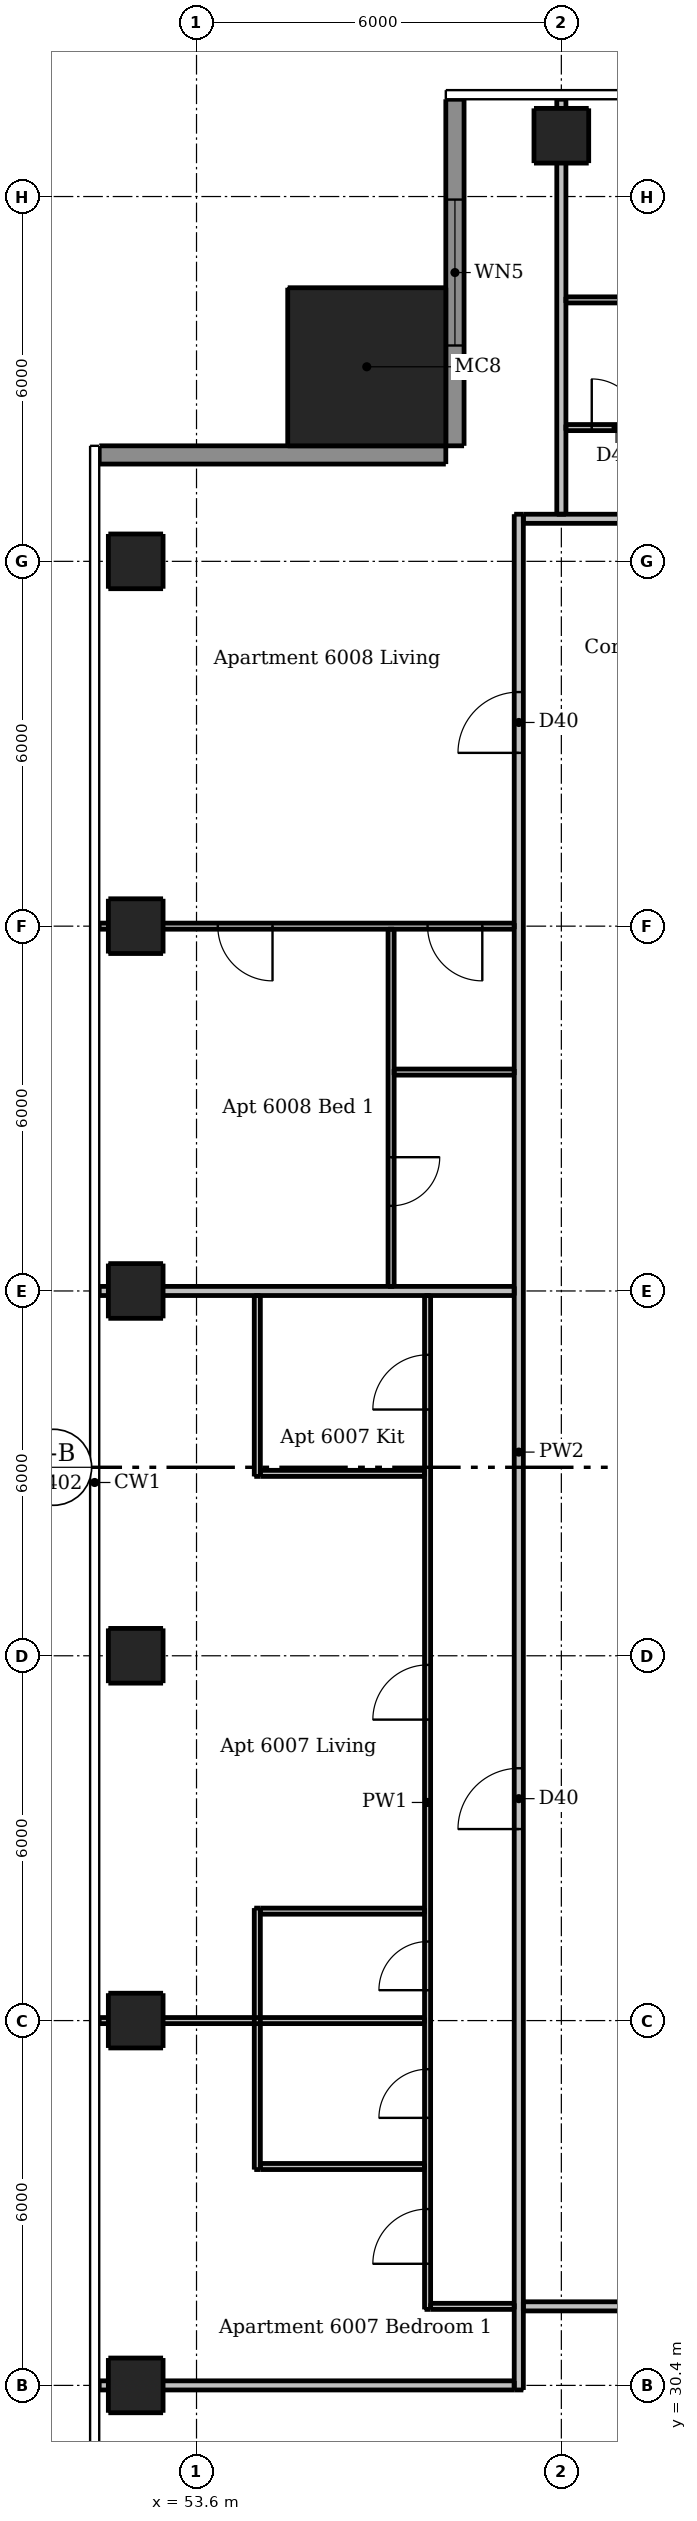
"""IFC4 building model, lengths in metres.
Left out: names, types, materials, properties, quantities, classifications, styles, units other than length and angle.
Written with IfcOpenShell. Run it as: python <this file> out.ifc"""

import sys

from ifc_helpers import new_model, si_unit, direction, frame, frame_2d, origin, origin_2d, place, context, subcontext, project, spatial, rectangle, extrude, element, fill, save


model = new_model("IFC4")
c1 = context("Model", 3, precision=1e-05, world=origin(), true_north=direction((0.0, 1.0)))
c2 = subcontext(c1, "Body", "Model", "MODEL_VIEW")
j1 = project(units=[si_unit("LENGTHUNIT", "METRE"), si_unit("PLANEANGLEUNIT", "RADIAN")], contexts=[c1])
p1 = place(None, origin())
s1 = spatial("IfcSite", under=j1, at=p1, CompositionType="ELEMENT")
p2 = place(p1, origin())
s2 = spatial("IfcBuilding", under=s1, at=p2, CompositionType="ELEMENT")
p3 = place(p2, frame((0.0, 0.0, 223.3)))
s3 = spatial("IfcBuildingStorey", under=s2, at=p3, CompositionType="ELEMENT", Elevation=223.3)
for number, where, z_axis, x_axis in (
    (1, (59.6, 67.4, 0.0), (0.0, 0.0, 1.0), (1.0, 0.0, 0.0)),
    (2, (52.6, 30.4, 0.0), (0.0, 0.0, 1.0), (1.0, 0.0, 0.0)),
    (3, (52.6, 36.4, 0.0), (0.0, 0.0, 1.0), (1.0, 0.0, 0.0)),
    (4, (52.6, 42.4, 0.0), (0.0, 0.0, 1.0), (1.0, 0.0, 0.0)),
    (5, (52.6, 48.4, 0.0), (0.0, 0.0, 1.0), (1.0, 0.0, 0.0)),
    (6, (52.6, 54.4, 0.0), (0.0, 0.0, 1.0), (1.0, 0.0, 0.0)),
    (7, (52.6, 60.4, 0.0), (0.0, 0.0, 1.0), (1.0, 0.0, 0.0)),
):
    element("IfcColumn", number, at=place(p3, frame(where, z_axis=z_axis, x_axis=x_axis)), inside=s3, PredefinedType="COLUMN", context=c2, shape_type="SweptSolid", body=[
        extrude(rectangle(XDim=0.9, YDim=0.9, at=origin_2d()), origin(), (0.0, 0.0, 1.0), 3.05),
    ])
p4 = place(p3, frame((56.4, 63.6, 0.0), z_axis=(0.0, 0.0, 1.0), x_axis=(1.0, 0.0, 0.0)))
e8 = element("IfcColumn", 8, at=p4, inside=s3, PredefinedType="COLUMN", context=c2, shape_type="SweptSolid", body=[
    extrude(rectangle(XDim=2.6, YDim=2.6, at=origin_2d()), origin(), (0.0, 0.0, 1.0), 3.3),
])
p5 = place(p3, frame((57.85, 68.0, 0.0), z_axis=(0.0, 0.0, 1.0), x_axis=(0.0, -1.0, 0.0)))
e9 = element("IfcWall", 9, at=p5, inside=s3, PredefinedType="SOLIDWALL", context=c2, shape_type="SweptSolid", body=[
    extrude(rectangle(XDim=5.7, YDim=0.3, at=frame_2d((2.85, 0.0))), origin(), (0.0, 0.0, 1.0), 3.05),
])
p6 = place(p5, frame((1.65, 0.0, 0.15)))
e10 = element("IfcOpeningElement", 10, at=p6, cuts=e9, PredefinedType="OPENING", context=c2, shape_type="SweptSolid", body=[
    extrude(rectangle(XDim=2.4, YDim=2.1, at=frame_2d((1.2, 1.05))), frame((0.0, 0.16, 0.0), z_axis=(0.0, -1.0, 0.0), x_axis=(1.0, 0.0, 0.0)), (0.0, 0.0, 1.0), 0.32),
])
p7 = place(p3, frame((57.7, 62.15, 0.0), z_axis=(0.0, 0.0, 1.0), x_axis=(-1.0, 0.0, 0.0)))
e11 = element("IfcWall", 11, at=p7, inside=s3, PredefinedType="SOLIDWALL", context=c2, shape_type="SweptSolid", body=[
    extrude(rectangle(XDim=5.7, YDim=0.3, at=frame_2d((2.85, 0.0))), origin(), (0.0, 0.0, 1.0), 3.05),
])
p8 = place(p3, frame((54.6, 33.95, 0.0), z_axis=(0.0, 0.0, 1.0), x_axis=(0.0, 1.0, 0.0)))
e12 = element("IfcWall", 12, at=p8, inside=s3, PredefinedType="PARTITIONING", context=c2, shape_type="SweptSolid", body=[
    extrude(rectangle(XDim=4.3, YDim=0.1, at=frame_2d((2.15, 0.0))), origin(), (0.0, 0.0, 1.0), 3.05),
])
p9 = place(p3, frame((54.6, 45.35, 0.0), z_axis=(0.0, 0.0, 1.0), x_axis=(0.0, 1.0, 0.0)))
e13 = element("IfcWall", 13, at=p9, inside=s3, PredefinedType="PARTITIONING", context=c2, shape_type="SweptSolid", body=[
    extrude(rectangle(XDim=2.975, YDim=0.1, at=frame_2d((1.487, 0.0))), origin(), (0.0, 0.0, 1.0), 3.05),
])
p10 = place(p3, frame((56.8, 54.35, 0.0), z_axis=(0.0, 0.0, 1.0), x_axis=(0.0, -1.0, 0.0)))
e14 = element("IfcWall", 14, at=p10, inside=s3, PredefinedType="PARTITIONING", context=c2, shape_type="SweptSolid", body=[
    extrude(rectangle(XDim=5.875, YDim=0.1, at=frame_2d((2.938, 0.0))), origin(), (0.0, 0.0, 1.0), 3.05),
])
p11 = place(p10, frame((3.75, 0.0, 0.0)))
e15 = element("IfcOpeningElement", 15, at=p11, cuts=e14, PredefinedType="OPENING", context=c2, shape_type="SweptSolid", body=[
    extrude(rectangle(XDim=0.8, YDim=2.1, at=frame_2d((0.4, 1.05))), frame((0.0, 0.06, 0.0), z_axis=(0.0, -1.0, 0.0), x_axis=(1.0, 0.0, 0.0)), (0.0, 0.0, 1.0), 0.12),
])
p12 = place(p3, frame((57.4, 31.65, 0.0), z_axis=(0.0, 0.0, 1.0), x_axis=(0.0, 1.0, 0.0)))
e16 = element("IfcWall", 16, at=p12, inside=s3, PredefinedType="PARTITIONING", context=c2, shape_type="SweptSolid", body=[
    extrude(rectangle(XDim=16.675, YDim=0.1, at=frame_2d((8.337, 0.0))), origin(), (0.0, 0.0, 1.0), 3.05),
])
p13 = place(p12, frame((9.7, 0.0, 0.0)))
e17 = element("IfcOpeningElement", 17, at=p13, cuts=e16, PredefinedType="OPENING", context=c2, shape_type="SweptSolid", body=[
    extrude(rectangle(XDim=0.9, YDim=2.1, at=frame_2d((0.45, 1.05))), frame((0.0, 0.06, 0.0), z_axis=(0.0, -1.0, 0.0), x_axis=(1.0, 0.0, 0.0)), (0.0, 0.0, 1.0), 0.12),
])
p14 = place(p12, frame((14.8, 0.0, 0.0)))
e18 = element("IfcOpeningElement", 18, at=p14, cuts=e16, PredefinedType="OPENING", context=c2, shape_type="SweptSolid", body=[
    extrude(rectangle(XDim=0.9, YDim=2.1, at=frame_2d((0.45, 1.05))), frame((0.0, 0.06, 0.0), z_axis=(0.0, -1.0, 0.0), x_axis=(1.0, 0.0, 0.0)), (0.0, 0.0, 1.0), 0.12),
])
p15 = place(p12, frame((5.25, 0.0, 0.0)))
e19 = element("IfcOpeningElement", 19, at=p15, cuts=e16, PredefinedType="OPENING", context=c2, shape_type="SweptSolid", body=[
    extrude(rectangle(XDim=0.8, YDim=2.1, at=frame_2d((0.4, 1.05))), frame((0.0, 0.06, 0.0), z_axis=(0.0, -1.0, 0.0), x_axis=(1.0, 0.0, 0.0)), (0.0, 0.0, 1.0), 0.12),
])
p16 = place(p12, frame((0.75, 0.0, 0.0)))
e20 = element("IfcOpeningElement", 20, at=p16, cuts=e16, PredefinedType="OPENING", context=c2, shape_type="SweptSolid", body=[
    extrude(rectangle(XDim=0.9, YDim=2.1, at=frame_2d((0.45, 1.05))), frame((0.0, 0.06, 0.0), z_axis=(0.0, -1.0, 0.0), x_axis=(1.0, 0.0, 0.0)), (0.0, 0.0, 1.0), 0.12),
])
p17 = place(p12, frame((3.15, 0.0, 0.0)))
e21 = element("IfcOpeningElement", 21, at=p17, cuts=e16, PredefinedType="OPENING", context=c2, shape_type="SweptSolid", body=[
    extrude(rectangle(XDim=0.8, YDim=2.1, at=frame_2d((0.4, 1.05))), frame((0.0, 0.06, 0.0), z_axis=(0.0, -1.0, 0.0), x_axis=(1.0, 0.0, 0.0)), (0.0, 0.0, 1.0), 0.12),
])
p18 = place(p3, frame((59.675, 64.7, 0.0), z_axis=(0.0, 0.0, 1.0), x_axis=(1.0, 0.0, 0.0)))
e22 = element("IfcWall", 22, at=p18, inside=s3, PredefinedType="PARTITIONING", context=c2, shape_type="SweptSolid", body=[
    extrude(rectangle(XDim=1.675, YDim=0.1, at=frame_2d((0.837, 0.0))), origin(), (0.0, 0.0, 1.0), 3.05),
])
p19 = place(p3, frame((59.675, 62.6, 0.0), z_axis=(0.0, 0.0, 1.0), x_axis=(1.0, 0.0, 0.0)))
e23 = element("IfcWall", 23, at=p19, inside=s3, PredefinedType="PARTITIONING", context=c2, shape_type="SweptSolid", body=[
    extrude(rectangle(XDim=17.85, YDim=0.1, at=frame_2d((8.925, 0.0))), origin(), (0.0, 0.0, 1.0), 3.05),
])
p20 = place(p19, frame((4.875, 0.0, 0.0)))
e24 = element("IfcOpeningElement", 24, at=p20, cuts=e23, PredefinedType="OPENING", context=c2, shape_type="SweptSolid", body=[
    extrude(rectangle(XDim=0.9, YDim=2.1, at=frame_2d((0.45, 1.05))), frame((0.0, 0.06, 0.0), z_axis=(0.0, -1.0, 0.0), x_axis=(1.0, 0.0, 0.0)), (0.0, 0.0, 1.0), 0.12),
])
p21 = place(p19, frame((9.975, 0.0, 0.0)))
e25 = element("IfcOpeningElement", 25, at=p21, cuts=e23, PredefinedType="OPENING", context=c2, shape_type="SweptSolid", body=[
    extrude(rectangle(XDim=0.9, YDim=2.1, at=frame_2d((0.45, 1.05))), frame((0.0, 0.06, 0.0), z_axis=(0.0, -1.0, 0.0), x_axis=(1.0, 0.0, 0.0)), (0.0, 0.0, 1.0), 0.12),
])
p22 = place(p19, frame((0.425, 0.0, 0.0)))
e26 = element("IfcOpeningElement", 26, at=p22, cuts=e23, PredefinedType="OPENING", context=c2, shape_type="SweptSolid", body=[
    extrude(rectangle(XDim=0.8, YDim=2.1, at=frame_2d((0.4, 1.05))), frame((0.0, 0.06, 0.0), z_axis=(0.0, -1.0, 0.0), x_axis=(1.0, 0.0, 0.0)), (0.0, 0.0, 1.0), 0.12),
])
p23 = place(p19, frame((15.675, 0.0, 0.0)))
e27 = element("IfcOpeningElement", 27, at=p23, cuts=e23, PredefinedType="OPENING", context=c2, shape_type="SweptSolid", body=[
    extrude(rectangle(XDim=0.9, YDim=2.1, at=frame_2d((0.45, 1.05))), frame((0.0, 0.06, 0.0), z_axis=(0.0, -1.0, 0.0), x_axis=(1.0, 0.0, 0.0)), (0.0, 0.0, 1.0), 0.12),
])
p24 = place(p19, frame((12.725, 0.0, 0.0)))
e28 = element("IfcOpeningElement", 28, at=p24, cuts=e23, PredefinedType="OPENING", context=c2, shape_type="SweptSolid", body=[
    extrude(rectangle(XDim=0.8, YDim=2.1, at=frame_2d((0.4, 1.05))), frame((0.0, 0.06, 0.0), z_axis=(0.0, -1.0, 0.0), x_axis=(1.0, 0.0, 0.0)), (0.0, 0.0, 1.0), 0.12),
])
p25 = place(p3, frame((58.825, 54.4, 0.0), z_axis=(0.0, 0.0, 1.0), x_axis=(-1.0, 0.0, 0.0)))
e29 = element("IfcWall", 29, at=p25, inside=s3, PredefinedType="PARTITIONING", context=c2, shape_type="SweptSolid", body=[
    extrude(rectangle(XDim=6.825, YDim=0.1, at=frame_2d((3.413, 0.0))), origin(), (0.0, 0.0, 1.0), 2.516),
])
p26 = place(p25, frame((0.525, 0.0, 0.0)))
e30 = element("IfcOpeningElement", 30, at=p26, cuts=e29, PredefinedType="OPENING", context=c2, shape_type="SweptSolid", body=[
    extrude(rectangle(XDim=0.9, YDim=2.1, at=frame_2d((0.45, 1.05))), frame((0.0, 0.06, 0.0), z_axis=(0.0, -1.0, 0.0), x_axis=(1.0, 0.0, 0.0)), (0.0, 0.0, 1.0), 0.12),
])
p27 = place(p25, frame((3.975, 0.0, 0.0)))
e31 = element("IfcOpeningElement", 31, at=p27, cuts=e29, PredefinedType="OPENING", context=c2, shape_type="SweptSolid", body=[
    extrude(rectangle(XDim=0.9, YDim=2.1, at=frame_2d((0.45, 1.05))), frame((0.0, 0.06, 0.0), z_axis=(0.0, -1.0, 0.0), x_axis=(1.0, 0.0, 0.0)), (0.0, 0.0, 1.0), 0.12),
])
p28 = place(p3, frame((56.85, 52.0, 0.0), z_axis=(0.0, 0.0, 1.0), x_axis=(1.0, 0.0, 0.0)))
e32 = element("IfcWall", 32, at=p28, inside=s3, PredefinedType="PARTITIONING", context=c2, shape_type="SweptSolid", body=[
    extrude(rectangle(XDim=1.975, YDim=0.1, at=frame_2d((0.987, 0.0))), origin(), (0.0, 0.0, 1.0), 3.05),
])
for number, where, z_axis, x_axis in (
    (33, (54.65, 45.4, 0.0), (0.0, 0.0, 1.0), (1.0, 0.0, 0.0)),
    (34, (54.65, 38.2, 0.0), (0.0, 0.0, 1.0), (1.0, 0.0, 0.0)),
):
    element("IfcWall", number, at=place(p3, frame(where, z_axis=z_axis, x_axis=x_axis)), inside=s3, PredefinedType="PARTITIONING", context=c2, shape_type="SweptSolid", body=[
        extrude(rectangle(XDim=2.7, YDim=0.1, at=frame_2d((1.35, 0.0))), origin(), (0.0, 0.0, 1.0), 3.05),
    ])
p29 = place(p3, frame((52.0, 36.4, 0.0), z_axis=(0.0, 0.0, 1.0), x_axis=(1.0, 0.0, 0.0)))
e35 = element("IfcWall", 35, at=p29, inside=s3, PredefinedType="PARTITIONING", context=c2, shape_type="SweptSolid", body=[
    extrude(rectangle(XDim=5.35, YDim=0.1, at=frame_2d((2.675, 0.0))), origin(), (0.0, 0.0, 1.0), 2.516),
])
p30 = place(p3, frame((54.65, 34.0, 0.0), z_axis=(0.0, 0.0, 1.0), x_axis=(1.0, 0.0, 0.0)))
e36 = element("IfcWall", 36, at=p30, inside=s3, PredefinedType="PARTITIONING", context=c2, shape_type="SweptSolid", body=[
    extrude(rectangle(XDim=2.7, YDim=0.1, at=frame_2d((1.35, 0.0))), origin(), (0.0, 0.0, 1.0), 3.05),
])
p31 = place(p3, frame((57.45, 31.7, 0.0), z_axis=(0.0, 0.0, 1.0), x_axis=(1.0, 0.0, 0.0)))
e37 = element("IfcWall", 37, at=p31, inside=s3, PredefinedType="PARTITIONING", context=c2, shape_type="SweptSolid", body=[
    extrude(rectangle(XDim=1.375, YDim=0.1, at=frame_2d((0.688, 0.0))), origin(), (0.0, 0.0, 1.0), 3.05),
])
p32 = place(p3, frame((58.9, 30.325, 0.0), z_axis=(0.0, 0.0, 1.0), x_axis=(0.0, 1.0, 0.0)))
e38 = element("IfcWall", 38, at=p32, inside=s3, PredefinedType="PARTITIONING", context=c2, shape_type="SweptSolid", body=[
    extrude(rectangle(XDim=30.85, YDim=0.15, at=frame_2d((15.425, 0.0))), origin(), (0.0, 0.0, 1.0), 3.05),
])
p33 = place(p32, frame((9.225, 0.0, 0.0)))
e39 = element("IfcOpeningElement", 39, at=p33, cuts=e38, PredefinedType="OPENING", context=c2, shape_type="SweptSolid", body=[
    extrude(rectangle(XDim=1.0, YDim=2.1, at=frame_2d((0.5, 1.05))), frame((0.0, 0.085, 0.0), z_axis=(0.0, -1.0, 0.0), x_axis=(1.0, 0.0, 0.0)), (0.0, 0.0, 1.0), 0.17),
])
p34 = place(p32, frame((26.925, 0.0, 0.0)))
e40 = element("IfcOpeningElement", 40, at=p34, cuts=e38, PredefinedType="OPENING", context=c2, shape_type="SweptSolid", body=[
    extrude(rectangle(XDim=1.0, YDim=2.1, at=frame_2d((0.5, 1.05))), frame((0.0, 0.085, 0.0), z_axis=(0.0, -1.0, 0.0), x_axis=(1.0, 0.0, 0.0)), (0.0, 0.0, 1.0), 0.17),
])
p35 = place(p3, frame((59.6, 61.175, 0.0), z_axis=(0.0, 0.0, 1.0), x_axis=(0.0, 1.0, 0.0)))
e41 = element("IfcWall", 41, at=p35, inside=s3, PredefinedType="PARTITIONING", context=c2, shape_type="SweptSolid", body=[
    extrude(rectangle(XDim=6.825, YDim=0.15, at=frame_2d((3.413, 0.0))), origin(), (0.0, 0.0, 1.0), 2.51),
])
p36 = place(p3, frame((58.975, 61.1, 0.0), z_axis=(0.0, 0.0, 1.0), x_axis=(1.0, 0.0, 0.0)))
e42 = element("IfcWall", 42, at=p36, inside=s3, PredefinedType="PARTITIONING", context=c2, shape_type="SweptSolid", body=[
    extrude(rectangle(XDim=29.25, YDim=0.15, at=frame_2d((14.625, 0.0))), origin(), (0.0, 0.0, 1.0), 3.05),
])
p37 = place(p36, frame((9.125, 0.0, 0.0)))
e43 = element("IfcOpeningElement", 43, at=p37, cuts=e42, PredefinedType="OPENING", context=c2, shape_type="SweptSolid", body=[
    extrude(rectangle(XDim=1.0, YDim=2.1, at=frame_2d((0.5, 1.05))), frame((0.0, 0.085, 0.0), z_axis=(0.0, -1.0, 0.0), x_axis=(1.0, 0.0, 0.0)), (0.0, 0.0, 1.0), 0.17),
])
p38 = place(p36, frame((26.475, 0.0, 0.0)))
e44 = element("IfcOpeningElement", 44, at=p38, cuts=e42, PredefinedType="OPENING", context=c2, shape_type="SweptSolid", body=[
    extrude(rectangle(XDim=1.0, YDim=2.1, at=frame_2d((0.5, 1.05))), frame((0.0, 0.085, 0.0), z_axis=(0.0, -1.0, 0.0), x_axis=(1.0, 0.0, 0.0)), (0.0, 0.0, 1.0), 0.17),
])
p39 = place(p3, frame((52.0, 48.4, 0.0), z_axis=(0.0, 0.0, 1.0), x_axis=(1.0, 0.0, 0.0)))
e45 = element("IfcWall", 45, at=p39, inside=s3, PredefinedType="PARTITIONING", context=c2, shape_type="SweptSolid", body=[
    extrude(rectangle(XDim=6.825, YDim=0.15, at=frame_2d((3.413, 0.0))), origin(), (0.0, 0.0, 1.0), 2.516),
])
p40 = place(p3, frame((89.525, 31.7, 0.0), z_axis=(0.0, 0.0, 1.0), x_axis=(-1.0, 0.0, 0.0)))
e46 = element("IfcWall", 46, at=p40, inside=s3, PredefinedType="PARTITIONING", context=c2, shape_type="SweptSolid", body=[
    extrude(rectangle(XDim=30.55, YDim=0.15, at=frame_2d((15.275, 0.0))), origin(), (0.0, 0.0, 1.0), 3.05),
])
p41 = place(p40, frame((26.775, 0.0, 0.0)))
e47 = element("IfcOpeningElement", 47, at=p41, cuts=e46, PredefinedType="OPENING", context=c2, shape_type="SweptSolid", body=[
    extrude(rectangle(XDim=1.0, YDim=2.1, at=frame_2d((0.5, 1.05))), frame((0.0, 0.085, 0.0), z_axis=(0.0, -1.0, 0.0), x_axis=(1.0, 0.0, 0.0)), (0.0, 0.0, 1.0), 0.17),
])
p42 = place(p40, frame((9.075, 0.0, 0.0)))
e48 = element("IfcOpeningElement", 48, at=p42, cuts=e46, PredefinedType="OPENING", context=c2, shape_type="SweptSolid", body=[
    extrude(rectangle(XDim=1.0, YDim=2.1, at=frame_2d((0.5, 1.05))), frame((0.0, 0.085, 0.0), z_axis=(0.0, -1.0, 0.0), x_axis=(1.0, 0.0, 0.0)), (0.0, 0.0, 1.0), 0.17),
])
p43 = place(p3, frame((52.0, 30.4, 0.0), z_axis=(0.0, 0.0, 1.0), x_axis=(1.0, 0.0, 0.0)))
e49 = element("IfcWall", 49, at=p43, inside=s3, PredefinedType="PARTITIONING", context=c2, shape_type="SweptSolid", body=[
    extrude(rectangle(XDim=6.825, YDim=0.15, at=frame_2d((3.413, 0.0))), origin(), (0.0, 0.0, 1.0), 2.647),
])
p44 = place(p6, origin())
e50 = element("IfcWindow", 50, at=p44, inside=s3, PartitioningType="DOUBLE_PANEL_VERTICAL", PredefinedType="WINDOW", context=c2, shape_type="SweptSolid", body=[
    extrude(rectangle(XDim=2.4, YDim=2.1, at=frame_2d((1.2, 1.05))), frame((0.0, 0.03, 0.0), z_axis=(0.0, -1.0, 0.0), x_axis=(1.0, 0.0, 0.0)), (0.0, 0.0, 1.0), 0.06),
])
fill(e10, e50)
p45 = place(p22, origin())
e51 = element("IfcDoor", 51, at=p45, inside=s3, OperationType="SINGLE_SWING_LEFT", PredefinedType="DOOR", context=c2, shape_type="SweptSolid", body=[
    extrude(rectangle(XDim=0.8, YDim=2.1, at=frame_2d((0.4, 1.05))), frame((0.0, 0.025, 0.0), z_axis=(0.0, -1.0, 0.0), x_axis=(1.0, 0.0, 0.0)), (0.0, 0.0, 1.0), 0.05),
])
fill(e26, e51)
p46 = place(p33, origin())
e52 = element("IfcDoor", 52, at=p46, inside=s3, OperationType="SINGLE_SWING_LEFT", PredefinedType="DOOR", context=c2, shape_type="SweptSolid", body=[
    extrude(rectangle(XDim=1.0, YDim=2.1, at=frame_2d((0.5, 1.05))), frame((0.0, 0.025, 0.0), z_axis=(0.0, -1.0, 0.0), x_axis=(1.0, 0.0, 0.0)), (0.0, 0.0, 1.0), 0.05),
])
fill(e39, e52)
p47 = place(p13, origin())
e53 = element("IfcDoor", 53, at=p47, inside=s3, OperationType="SINGLE_SWING_LEFT", PredefinedType="DOOR", context=c2, shape_type="SweptSolid", body=[
    extrude(rectangle(XDim=0.9, YDim=2.1, at=frame_2d((0.45, 1.05))), frame((0.0, 0.025, 0.0), z_axis=(0.0, -1.0, 0.0), x_axis=(1.0, 0.0, 0.0)), (0.0, 0.0, 1.0), 0.05),
])
fill(e17, e53)
p48 = place(p14, origin())
e54 = element("IfcDoor", 54, at=p48, inside=s3, OperationType="SINGLE_SWING_LEFT", PredefinedType="DOOR", context=c2, shape_type="SweptSolid", body=[
    extrude(rectangle(XDim=0.9, YDim=2.1, at=frame_2d((0.45, 1.05))), frame((0.0, 0.025, 0.0), z_axis=(0.0, -1.0, 0.0), x_axis=(1.0, 0.0, 0.0)), (0.0, 0.0, 1.0), 0.05),
])
fill(e18, e54)
p49 = place(p15, origin())
e55 = element("IfcDoor", 55, at=p49, inside=s3, OperationType="SINGLE_SWING_LEFT", PredefinedType="DOOR", context=c2, shape_type="SweptSolid", body=[
    extrude(rectangle(XDim=0.8, YDim=2.1, at=frame_2d((0.4, 1.05))), frame((0.0, 0.025, 0.0), z_axis=(0.0, -1.0, 0.0), x_axis=(1.0, 0.0, 0.0)), (0.0, 0.0, 1.0), 0.05),
])
fill(e19, e55)
p50 = place(p16, origin())
e56 = element("IfcDoor", 56, at=p50, inside=s3, OperationType="SINGLE_SWING_LEFT", PredefinedType="DOOR", context=c2, shape_type="SweptSolid", body=[
    extrude(rectangle(XDim=0.9, YDim=2.1, at=frame_2d((0.45, 1.05))), frame((0.0, 0.025, 0.0), z_axis=(0.0, -1.0, 0.0), x_axis=(1.0, 0.0, 0.0)), (0.0, 0.0, 1.0), 0.05),
])
fill(e20, e56)
p51 = place(p17, origin())
e57 = element("IfcDoor", 57, at=p51, inside=s3, OperationType="SINGLE_SWING_LEFT", PredefinedType="DOOR", context=c2, shape_type="SweptSolid", body=[
    extrude(rectangle(XDim=0.8, YDim=2.1, at=frame_2d((0.4, 1.05))), frame((0.0, 0.025, 0.0), z_axis=(0.0, -1.0, 0.0), x_axis=(1.0, 0.0, 0.0)), (0.0, 0.0, 1.0), 0.05),
])
fill(e21, e57)
p52 = place(p34, origin())
e58 = element("IfcDoor", 58, at=p52, inside=s3, OperationType="SINGLE_SWING_LEFT", PredefinedType="DOOR", context=c2, shape_type="SweptSolid", body=[
    extrude(rectangle(XDim=1.0, YDim=2.1, at=frame_2d((0.5, 1.05))), frame((0.0, 0.025, 0.0), z_axis=(0.0, -1.0, 0.0), x_axis=(1.0, 0.0, 0.0)), (0.0, 0.0, 1.0), 0.05),
])
fill(e40, e58)
p53 = place(p26, origin())
e59 = element("IfcDoor", 59, at=p53, inside=s3, OperationType="SINGLE_SWING_LEFT", PredefinedType="DOOR", context=c2, shape_type="SweptSolid", body=[
    extrude(rectangle(XDim=0.9, YDim=2.1, at=frame_2d((0.45, 1.05))), frame((0.0, 0.025, 0.0), z_axis=(0.0, -1.0, 0.0), x_axis=(1.0, 0.0, 0.0)), (0.0, 0.0, 1.0), 0.05),
])
fill(e30, e59)
p54 = place(p27, origin())
e60 = element("IfcDoor", 60, at=p54, inside=s3, OperationType="SINGLE_SWING_LEFT", PredefinedType="DOOR", context=c2, shape_type="SweptSolid", body=[
    extrude(rectangle(XDim=0.9, YDim=2.1, at=frame_2d((0.45, 1.05))), frame((0.0, 0.025, 0.0), z_axis=(0.0, -1.0, 0.0), x_axis=(1.0, 0.0, 0.0)), (0.0, 0.0, 1.0), 0.05),
])
fill(e31, e60)
p55 = place(p11, origin())
e61 = element("IfcDoor", 61, at=p55, inside=s3, OperationType="SINGLE_SWING_LEFT", PredefinedType="DOOR", context=c2, shape_type="SweptSolid", body=[
    extrude(rectangle(XDim=0.8, YDim=2.1, at=frame_2d((0.4, 1.05))), frame((0.0, 0.025, 0.0), z_axis=(0.0, -1.0, 0.0), x_axis=(1.0, 0.0, 0.0)), (0.0, 0.0, 1.0), 0.05),
])
fill(e15, e61)
save(model, sys.argv[1])
